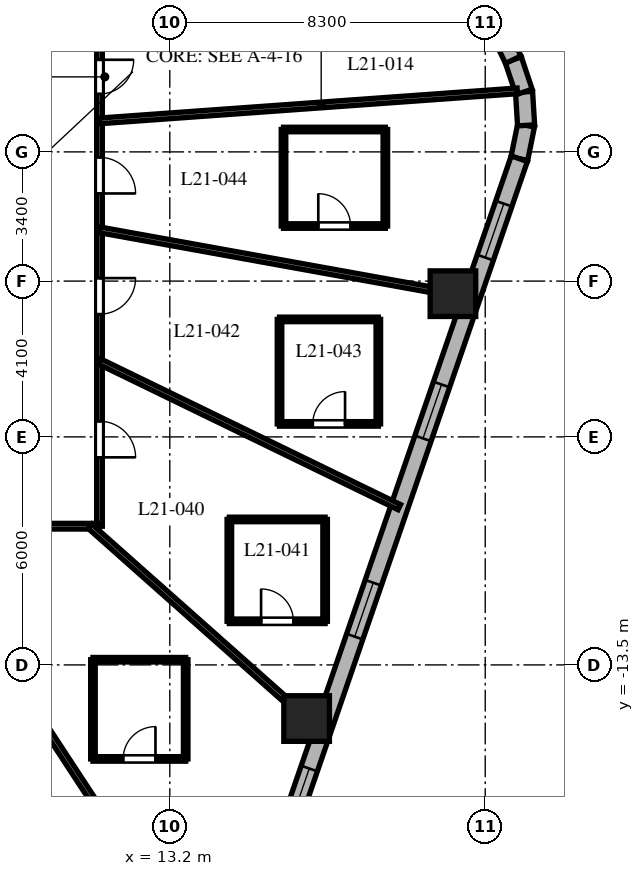
"""IFC4 building model, lengths in metres.
Left out: names, types, materials, properties, quantities, classifications, styles, units other than length and angle.
Written with IfcOpenShell. Run it as: python <this file> out.ifc"""

import sys

from ifc_helpers import new_model, si_unit, direction, frame, frame_2d, origin, origin_2d, place, context, subcontext, project, spatial, rectangle, extrude, element, fill, save


model = new_model("IFC4")
c1 = context("Model", 3, precision=1e-05, world=origin(), true_north=direction((0.0, 1.0)))
c2 = subcontext(c1, "Body", "Model", "MODEL_VIEW")
j1 = project(units=[si_unit("LENGTHUNIT", "METRE"), si_unit("PLANEANGLEUNIT", "RADIAN")], contexts=[c1])
p1 = place(None, origin())
s1 = spatial("IfcSite", under=j1, at=p1, CompositionType="ELEMENT")
p2 = place(p1, origin())
s2 = spatial("IfcBuilding", under=s1, at=p2, CompositionType="ELEMENT")
p3 = place(p2, frame((0.0, 0.0, 91.4)))
s3 = spatial("IfcBuildingStorey", under=s2, at=p3, CompositionType="ELEMENT", Elevation=91.4)
for number, where, z_axis, x_axis in (
    (1, (16.8, -14.911, 0.0), (0.0, 0.0, 1.0), (1.0, 0.0, 0.0)),
    (2, (20.65, -3.731, 0.0), (0.0, 0.0, 1.0), (1.0, 0.0, 0.0)),
):
    element("IfcColumn", number, at=place(p3, frame(where, z_axis=z_axis, x_axis=x_axis)), inside=s3, PredefinedType="COLUMN", context=c2, shape_type="SweptSolid", body=[
        extrude(rectangle(XDim=1.2, YDim=1.2, at=origin_2d()), origin(), (0.0, 0.0, 1.0), 3.7),
    ])
p4 = place(p3, frame((22.397, -0.179, 0.0), z_axis=(0.0, 0.0, 1.0), x_axis=(0.199313589404, 0.979935759669, 0.0)))
e3 = element("IfcWall", 3, at=p4, inside=s3, PredefinedType="SOLIDWALL", context=c2, shape_type="SweptSolid", body=[
    extrude(rectangle(XDim=0.896, YDim=0.45, at=frame_2d((0.448, 0.0))), origin(), (0.0, 0.0, 1.0), 3.4),
])
p5 = place(p3, frame((22.575, 0.698, 0.0), z_axis=(0.0, 0.0, 1.0), x_axis=(-0.060980441946, 0.998138961117, 0.0)))
e4 = element("IfcWall", 4, at=p5, inside=s3, PredefinedType="SOLIDWALL", context=c2, shape_type="SweptSolid", body=[
    extrude(rectangle(XDim=0.881, YDim=0.45, at=frame_2d((0.44, 0.0))), origin(), (0.0, 0.0, 1.0), 3.4),
])
p6 = place(p3, frame((22.522, 1.577, 0.0), z_axis=(0.0, 0.0, 1.0), x_axis=(-0.317372694837, 0.948300887151, 0.0)))
e5 = element("IfcWall", 5, at=p6, inside=s3, PredefinedType="SOLIDWALL", context=c2, shape_type="SweptSolid", body=[
    extrude(rectangle(XDim=0.896, YDim=0.45, at=frame_2d((0.448, 0.0))), origin(), (0.0, 0.0, 1.0), 3.4),
])
p7 = place(p3, frame((15.992, -18.777, 0.0), z_axis=(0.0, 0.0, 1.0), x_axis=(0.325606988926, 0.945505202927, 0.0)))
e6 = element("IfcWall", 6, at=p7, inside=s3, PredefinedType="SOLIDWALL", context=c2, shape_type="SweptSolid", body=[
    extrude(rectangle(XDim=19.669, YDim=0.45, at=frame_2d((9.835, 0.0))), origin(), (0.0, 0.0, 1.0), 3.4),
])
p8 = place(p7, frame((1.197, 0.0, 0.8)))
e7 = element("IfcOpeningElement", 7, at=p8, cuts=e6, PredefinedType="OPENING", context=c2, shape_type="SweptSolid", body=[
    extrude(rectangle(XDim=1.5, YDim=1.8, at=frame_2d((0.75, 0.9))), frame((0.0, 0.235, 0.0), z_axis=(0.0, -1.0, 0.0), x_axis=(1.0, 0.0, 0.0)), (0.0, 0.0, 1.0), 0.47),
])
p9 = place(p7, frame((6.368, 0.0, 0.8)))
e8 = element("IfcOpeningElement", 8, at=p9, cuts=e6, PredefinedType="OPENING", context=c2, shape_type="SweptSolid", body=[
    extrude(rectangle(XDim=1.5, YDim=1.8, at=frame_2d((0.75, 0.9))), frame((0.0, 0.235, 0.0), z_axis=(0.0, -1.0, 0.0), x_axis=(1.0, 0.0, 0.0)), (0.0, 0.0, 1.0), 0.47),
])
p10 = place(p7, frame((11.885, 0.0, 0.8)))
e9 = element("IfcOpeningElement", 9, at=p10, cuts=e6, PredefinedType="OPENING", context=c2, shape_type="SweptSolid", body=[
    extrude(rectangle(XDim=1.5, YDim=1.8, at=frame_2d((0.75, 0.9))), frame((0.0, 0.235, 0.0), z_axis=(0.0, -1.0, 0.0), x_axis=(1.0, 0.0, 0.0)), (0.0, 0.0, 1.0), 0.47),
])
p11 = place(p7, frame((16.918, 0.0, 0.8)))
e10 = element("IfcOpeningElement", 10, at=p11, cuts=e6, PredefinedType="OPENING", context=c2, shape_type="SweptSolid", body=[
    extrude(rectangle(XDim=1.5, YDim=1.8, at=frame_2d((0.75, 0.9))), frame((0.0, 0.235, 0.0), z_axis=(0.0, -1.0, 0.0), x_axis=(1.0, 0.0, 0.0)), (0.0, 0.0, 1.0), 0.47),
])
p12 = place(p3, frame((22.238, 2.427, 0.0), z_axis=(0.0, 0.0, 1.0), x_axis=(-0.438374803278, 0.898792262901, 0.0)))
e11 = element("IfcWall", 11, at=p12, inside=s3, PredefinedType="SOLIDWALL", context=c2, shape_type="SweptSolid", body=[
    extrude(rectangle(XDim=18.618, YDim=0.45, at=frame_2d((9.309, 0.0))), origin(), (0.0, 0.0, 1.0), 3.4),
])
p13 = place(p12, frame((4.62, 0.0, 0.0)))
e12 = element("IfcOpeningElement", 12, at=p13, cuts=e11, PredefinedType="OPENING", context=c2, shape_type="SweptSolid", body=[
    extrude(rectangle(XDim=1.0, YDim=2.15, at=frame_2d((0.5, 1.075))), frame((0.0, 0.235, 0.0), z_axis=(0.0, -1.0, 0.0), x_axis=(1.0, 0.0, 0.0)), (0.0, 0.0, 1.0), 0.47),
])
p14 = place(p12, frame((1.163, 0.0, 0.8)))
e13 = element("IfcOpeningElement", 13, at=p14, cuts=e11, PredefinedType="OPENING", context=c2, shape_type="SweptSolid", body=[
    extrude(rectangle(XDim=1.5, YDim=1.8, at=frame_2d((0.75, 0.9))), frame((0.0, 0.235, 0.0), z_axis=(0.0, -1.0, 0.0), x_axis=(1.0, 0.0, 0.0)), (0.0, 0.0, 1.0), 0.47),
])
p15 = place(p12, frame((8.61, 0.0, 0.8)))
e14 = element("IfcOpeningElement", 14, at=p15, cuts=e11, PredefinedType="OPENING", context=c2, shape_type="SweptSolid", body=[
    extrude(rectangle(XDim=1.5, YDim=1.8, at=frame_2d((0.75, 0.9))), frame((0.0, 0.235, 0.0), z_axis=(0.0, -1.0, 0.0), x_axis=(1.0, 0.0, 0.0)), (0.0, 0.0, 1.0), 0.47),
])
p16 = place(p12, frame((16.006, 0.0, 0.8)))
e15 = element("IfcOpeningElement", 15, at=p16, cuts=e11, PredefinedType="OPENING", context=c2, shape_type="SweptSolid", body=[
    extrude(rectangle(XDim=1.5, YDim=1.8, at=frame_2d((0.75, 0.9))), frame((0.0, 0.235, 0.0), z_axis=(0.0, -1.0, 0.0), x_axis=(1.0, 0.0, 0.0)), (0.0, 0.0, 1.0), 0.47),
])
p17 = place(p3, frame((11.35, 9.85, 0.0), z_axis=(0.0, 0.0, 1.0), x_axis=(0.0, -1.0, 0.0)))
e16 = element("IfcWall", 16, at=p17, inside=s3, PredefinedType="PARTITIONING", context=c2, shape_type="SweptSolid", body=[
    extrude(rectangle(XDim=19.7, YDim=0.15, at=frame_2d((9.85, 0.0))), origin(), (0.0, 0.0, 1.0), 2.84),
])
p18 = place(p17, frame((7.426, 0.0, 0.0)))
e17 = element("IfcOpeningElement", 17, at=p18, cuts=e16, PredefinedType="OPENING", context=c2, shape_type="SweptSolid", body=[
    extrude(rectangle(XDim=0.9, YDim=2.03, at=frame_2d((0.45, 1.015))), frame((0.0, 0.085, 0.0), z_axis=(0.0, -1.0, 0.0), x_axis=(1.0, 0.0, 0.0)), (0.0, 0.0, 1.0), 0.17),
])
p19 = place(p17, frame((3.008, 0.0, 0.0)))
e18 = element("IfcOpeningElement", 18, at=p19, cuts=e16, PredefinedType="OPENING", context=c2, shape_type="SweptSolid", body=[
    extrude(rectangle(XDim=0.95, YDim=2.03, at=frame_2d((0.475, 1.015))), frame((0.0, 0.085, 0.0), z_axis=(0.0, -1.0, 0.0), x_axis=(1.0, 0.0, 0.0)), (0.0, 0.0, 1.0), 0.17),
])
p20 = place(p17, frame((16.938, 0.0, 0.0)))
e19 = element("IfcOpeningElement", 19, at=p20, cuts=e16, PredefinedType="OPENING", context=c2, shape_type="SweptSolid", body=[
    extrude(rectangle(XDim=0.95, YDim=2.03, at=frame_2d((0.475, 1.015))), frame((0.0, 0.085, 0.0), z_axis=(0.0, -1.0, 0.0), x_axis=(1.0, 0.0, 0.0)), (0.0, 0.0, 1.0), 0.17),
])
p21 = place(p17, frame((13.171, 0.0, 0.0)))
e20 = element("IfcOpeningElement", 20, at=p21, cuts=e16, PredefinedType="OPENING", context=c2, shape_type="SweptSolid", body=[
    extrude(rectangle(XDim=0.95, YDim=2.03, at=frame_2d((0.475, 1.015))), frame((0.0, 0.085, 0.0), z_axis=(0.0, -1.0, 0.0), x_axis=(1.0, 0.0, 0.0)), (0.0, 0.0, 1.0), 0.17),
])
p22 = place(p17, frame((9.994, 0.0, 0.0)))
e21 = element("IfcOpeningElement", 21, at=p22, cuts=e16, PredefinedType="OPENING", context=c2, shape_type="SweptSolid", body=[
    extrude(rectangle(XDim=0.95, YDim=2.03, at=frame_2d((0.475, 1.015))), frame((0.0, 0.085, 0.0), z_axis=(0.0, -1.0, 0.0), x_axis=(1.0, 0.0, 0.0)), (0.0, 0.0, 1.0), 0.17),
])
p23 = place(p3, frame((11.35, -9.85, 0.0), z_axis=(0.0, 0.0, 1.0), x_axis=(-1.0, 0.0, 0.0)))
e22 = element("IfcWall", 22, at=p23, inside=s3, PredefinedType="PARTITIONING", context=c2, shape_type="SweptSolid", body=[
    extrude(rectangle(XDim=22.7, YDim=0.15, at=frame_2d((11.35, 0.0))), origin(), (0.0, 0.0, 1.0), 2.84),
])
p24 = place(p23, frame((17.237, 0.0, 0.0)))
e23 = element("IfcOpeningElement", 23, at=p24, cuts=e22, PredefinedType="OPENING", context=c2, shape_type="SweptSolid", body=[
    extrude(rectangle(XDim=0.95, YDim=2.03, at=frame_2d((0.475, 1.015))), frame((0.0, 0.085, 0.0), z_axis=(0.0, -1.0, 0.0), x_axis=(1.0, 0.0, 0.0)), (0.0, 0.0, 1.0), 0.17),
])
p25 = place(p23, frame((11.994, 0.0, 0.0)))
e24 = element("IfcOpeningElement", 24, at=p25, cuts=e22, PredefinedType="OPENING", context=c2, shape_type="SweptSolid", body=[
    extrude(rectangle(XDim=0.95, YDim=2.03, at=frame_2d((0.475, 1.015))), frame((0.0, 0.085, 0.0), z_axis=(0.0, -1.0, 0.0), x_axis=(1.0, 0.0, 0.0)), (0.0, 0.0, 1.0), 0.17),
])
p26 = place(p23, frame((8.559, 0.0, 0.0)))
e25 = element("IfcOpeningElement", 25, at=p26, cuts=e22, PredefinedType="OPENING", context=c2, shape_type="SweptSolid", body=[
    extrude(rectangle(XDim=0.95, YDim=2.03, at=frame_2d((0.475, 1.015))), frame((0.0, 0.085, 0.0), z_axis=(0.0, -1.0, 0.0), x_axis=(1.0, 0.0, 0.0)), (0.0, 0.0, 1.0), 0.17),
])
p27 = place(p23, frame((5.728, 0.0, 0.0)))
e26 = element("IfcOpeningElement", 26, at=p27, cuts=e22, PredefinedType="OPENING", context=c2, shape_type="SweptSolid", body=[
    extrude(rectangle(XDim=0.9, YDim=2.03, at=frame_2d((0.45, 1.015))), frame((0.0, 0.085, 0.0), z_axis=(0.0, -1.0, 0.0), x_axis=(1.0, 0.0, 0.0)), (0.0, 0.0, 1.0), 0.17),
])
p28 = place(p23, frame((2.093, 0.0, 0.0)))
e27 = element("IfcOpeningElement", 27, at=p28, cuts=e22, PredefinedType="OPENING", context=c2, shape_type="SweptSolid", body=[
    extrude(rectangle(XDim=0.95, YDim=2.03, at=frame_2d((0.475, 1.015))), frame((0.0, 0.085, 0.0), z_axis=(0.0, -1.0, 0.0), x_axis=(1.0, 0.0, 0.0)), (0.0, 0.0, 1.0), 0.17),
])
p29 = place(p3, frame((11.35, 0.816, 0.0), z_axis=(0.0, 0.0, 1.0), x_axis=(0.997427684746, 0.071679939324, 0.0)))
e28 = element("IfcWall", 28, at=p29, inside=s3, PredefinedType="PARTITIONING", context=c2, shape_type="SweptSolid", body=[
    extrude(rectangle(XDim=11.022, YDim=0.15, at=frame_2d((5.511, 0.0))), origin(), (0.0, 0.0, 1.0), 2.54),
])
p30 = place(p3, frame((6.454, -9.85, 0.0), z_axis=(0.0, 0.0, 1.0), x_axis=(0.548052950111, -0.836443640584, 0.0)))
e29 = element("IfcWall", 29, at=p30, inside=s3, PredefinedType="PARTITIONING", context=c2, shape_type="SweptSolid", body=[
    extrude(rectangle(XDim=13.019, YDim=0.15, at=frame_2d((6.51, 0.0))), origin(), (0.0, 0.0, 1.0), 2.54),
])
p31 = place(p3, frame((11.098, -9.85, 0.0), z_axis=(0.0, 0.0, 1.0), x_axis=(0.747904295103, -0.663806572253, 0.0)))
e30 = element("IfcWall", 30, at=p31, inside=s3, PredefinedType="PARTITIONING", context=c2, shape_type="SweptSolid", body=[
    extrude(rectangle(XDim=8.16, YDim=0.15, at=frame_2d((4.08, 0.0))), origin(), (0.0, 0.0, 1.0), 2.54),
])
p32 = place(p3, frame((11.35, -5.515, 0.0), z_axis=(0.0, 0.0, 1.0), x_axis=(0.899424695618, -0.437075756492, 0.0)))
e31 = element("IfcWall", 31, at=p32, inside=s3, PredefinedType="PARTITIONING", context=c2, shape_type="SweptSolid", body=[
    extrude(rectangle(XDim=8.771, YDim=0.15, at=frame_2d((4.386, 0.0))), origin(), (0.0, 0.0, 1.0), 2.54),
])
p33 = place(p3, frame((11.35, -2.051, 0.0), z_axis=(0.0, 0.0, 1.0), x_axis=(0.984068313063, -0.177790762484, 0.0)))
e32 = element("IfcWall", 32, at=p33, inside=s3, PredefinedType="PARTITIONING", context=c2, shape_type="SweptSolid", body=[
    extrude(rectangle(XDim=9.951, YDim=0.15, at=frame_2d((4.976, 0.0))), origin(), (0.0, 0.0, 1.0), 2.54),
])
p34 = place(p3, frame((11.178, -15.974, 0.0), z_axis=(0.0, 0.0, 1.0), x_axis=(1.0, 0.0, 0.0)))
e33 = element("IfcWall", 33, at=p34, inside=s3, PredefinedType="PARTITIONING", context=c2, shape_type="SweptSolid", body=[
    extrude(rectangle(XDim=2.44, YDim=0.12, at=frame_2d((1.22, 0.0))), origin(), (0.0, 0.0, 1.0), 3.4),
])
p35 = place(p34, frame((0.795, 0.0, 0.0)))
e34 = element("IfcOpeningElement", 34, at=p35, cuts=e33, PredefinedType="OPENING", context=c2, shape_type="SweptSolid", body=[
    extrude(rectangle(XDim=0.85, YDim=2.03, at=frame_2d((0.425, 1.015))), frame((0.0, 0.07, 0.0), z_axis=(0.0, -1.0, 0.0), x_axis=(1.0, 0.0, 0.0)), (0.0, 0.0, 1.0), 0.14),
])
p36 = place(p3, frame((13.618, -15.974, 0.0), z_axis=(0.0, 0.0, 1.0), x_axis=(0.0, 1.0, 0.0)))
e35 = element("IfcWall", 35, at=p36, inside=s3, PredefinedType="PARTITIONING", context=c2, shape_type="SweptSolid", body=[
    extrude(rectangle(XDim=2.61, YDim=0.12, at=frame_2d((1.305, 0.0))), origin(), (0.0, 0.0, 1.0), 3.4),
])
p37 = place(p3, frame((13.618, -13.364, 0.0), z_axis=(0.0, 0.0, 1.0), x_axis=(-1.0, 0.0, 0.0)))
e36 = element("IfcWall", 36, at=p37, inside=s3, PredefinedType="PARTITIONING", context=c2, shape_type="SweptSolid", body=[
    extrude(rectangle(XDim=2.44, YDim=0.12, at=frame_2d((1.22, 0.0))), origin(), (0.0, 0.0, 1.0), 2.927),
])
p38 = place(p3, frame((11.178, -13.364, 0.0), z_axis=(0.0, 0.0, 1.0), x_axis=(0.0, -1.0, 0.0)))
e37 = element("IfcWall", 37, at=p38, inside=s3, PredefinedType="PARTITIONING", context=c2, shape_type="SweptSolid", body=[
    extrude(rectangle(XDim=2.61, YDim=0.12, at=frame_2d((1.305, 0.0))), origin(), (0.0, 0.0, 1.0), 2.927),
])
p39 = place(p3, frame((14.767, -12.352, 0.0), z_axis=(0.0, 0.0, 1.0), x_axis=(1.0, 0.0, 0.0)))
e38 = element("IfcWall", 38, at=p39, inside=s3, PredefinedType="PARTITIONING", context=c2, shape_type="SweptSolid", body=[
    extrude(rectangle(XDim=2.52, YDim=0.12, at=frame_2d((1.26, 0.0))), origin(), (0.0, 0.0, 1.0), 3.4),
])
p40 = place(p39, frame((0.835, 0.0, 0.0)))
e39 = element("IfcOpeningElement", 39, at=p40, cuts=e38, PredefinedType="OPENING", context=c2, shape_type="SweptSolid", body=[
    extrude(rectangle(XDim=0.85, YDim=2.03, at=frame_2d((0.425, 1.015))), frame((0.0, 0.07, 0.0), z_axis=(0.0, -1.0, 0.0), x_axis=(1.0, 0.0, 0.0)), (0.0, 0.0, 1.0), 0.14),
])
p41 = place(p3, frame((17.287, -12.352, 0.0), z_axis=(0.0, 0.0, 1.0), x_axis=(0.0, 1.0, 0.0)))
e40 = element("IfcWall", 40, at=p41, inside=s3, PredefinedType="PARTITIONING", context=c2, shape_type="SweptSolid", body=[
    extrude(rectangle(XDim=2.68, YDim=0.12, at=frame_2d((1.34, 0.0))), origin(), (0.0, 0.0, 1.0), 3.4),
])
p42 = place(p3, frame((17.287, -9.672, 0.0), z_axis=(0.0, 0.0, 1.0), x_axis=(-1.0, 0.0, 0.0)))
e41 = element("IfcWall", 41, at=p42, inside=s3, PredefinedType="PARTITIONING", context=c2, shape_type="SweptSolid", body=[
    extrude(rectangle(XDim=2.52, YDim=0.12, at=frame_2d((1.26, 0.0))), origin(), (0.0, 0.0, 1.0), 2.972),
])
p43 = place(p3, frame((14.767, -9.672, 0.0), z_axis=(0.0, 0.0, 1.0), x_axis=(0.0, -1.0, 0.0)))
e42 = element("IfcWall", 42, at=p43, inside=s3, PredefinedType="PARTITIONING", context=c2, shape_type="SweptSolid", body=[
    extrude(rectangle(XDim=2.68, YDim=0.12, at=frame_2d((1.34, 0.0))), origin(), (0.0, 0.0, 1.0), 2.972),
])
p44 = place(p3, frame((16.087, -7.158, 0.0), z_axis=(0.0, 0.0, 1.0), x_axis=(1.0, 0.0, 0.0)))
e43 = element("IfcWall", 43, at=p44, inside=s3, PredefinedType="PARTITIONING", context=c2, shape_type="SweptSolid", body=[
    extrude(rectangle(XDim=2.6, YDim=0.12, at=frame_2d((1.3, 0.0))), origin(), (0.0, 0.0, 1.0), 2.972),
])
p45 = place(p44, frame((0.875, 0.0, 0.0)))
e44 = element("IfcOpeningElement", 44, at=p45, cuts=e43, PredefinedType="OPENING", context=c2, shape_type="SweptSolid", body=[
    extrude(rectangle(XDim=0.85, YDim=2.03, at=frame_2d((0.425, 1.015))), frame((0.0, 0.07, 0.0), z_axis=(0.0, -1.0, 0.0), x_axis=(1.0, 0.0, 0.0)), (0.0, 0.0, 1.0), 0.14),
])
p46 = place(p3, frame((18.687, -7.158, 0.0), z_axis=(0.0, 0.0, 1.0), x_axis=(0.0, 1.0, 0.0)))
e45 = element("IfcWall", 45, at=p46, inside=s3, PredefinedType="PARTITIONING", context=c2, shape_type="SweptSolid", body=[
    extrude(rectangle(XDim=2.75, YDim=0.12, at=frame_2d((1.375, 0.0))), origin(), (0.0, 0.0, 1.0), 2.84),
])
p47 = place(p3, frame((18.687, -4.408, 0.0), z_axis=(0.0, 0.0, 1.0), x_axis=(-1.0, 0.0, 0.0)))
e46 = element("IfcWall", 46, at=p47, inside=s3, PredefinedType="PARTITIONING", context=c2, shape_type="SweptSolid", body=[
    extrude(rectangle(XDim=2.6, YDim=0.12, at=frame_2d((1.3, 0.0))), origin(), (0.0, 0.0, 1.0), 2.84),
])
p48 = place(p3, frame((16.087, -4.408, 0.0), z_axis=(0.0, 0.0, 1.0), x_axis=(0.0, -1.0, 0.0)))
e47 = element("IfcWall", 47, at=p48, inside=s3, PredefinedType="PARTITIONING", context=c2, shape_type="SweptSolid", body=[
    extrude(rectangle(XDim=2.75, YDim=0.12, at=frame_2d((1.375, 0.0))), origin(), (0.0, 0.0, 1.0), 2.84),
])
p49 = place(p3, frame((16.192, -1.951, 0.0), z_axis=(0.0, 0.0, 1.0), x_axis=(1.0, 0.0, 0.0)))
e48 = element("IfcWall", 48, at=p49, inside=s3, PredefinedType="PARTITIONING", context=c2, shape_type="SweptSolid", body=[
    extrude(rectangle(XDim=2.68, YDim=0.12, at=frame_2d((1.34, 0.0))), origin(), (0.0, 0.0, 1.0), 2.841),
])
p50 = place(p49, frame((0.915, 0.0, 0.0)))
e49 = element("IfcOpeningElement", 49, at=p50, cuts=e48, PredefinedType="OPENING", context=c2, shape_type="SweptSolid", body=[
    extrude(rectangle(XDim=0.85, YDim=2.03, at=frame_2d((0.425, 1.015))), frame((0.0, 0.07, 0.0), z_axis=(0.0, -1.0, 0.0), x_axis=(1.0, 0.0, 0.0)), (0.0, 0.0, 1.0), 0.14),
])
p51 = place(p3, frame((18.872, -1.951, 0.0), z_axis=(0.0, 0.0, 1.0), x_axis=(0.0, 1.0, 0.0)))
e50 = element("IfcWall", 50, at=p51, inside=s3, PredefinedType="PARTITIONING", context=c2, shape_type="SweptSolid", body=[
    extrude(rectangle(XDim=2.54, YDim=0.12, at=frame_2d((1.27, 0.0))), origin(), (0.0, 0.0, 1.0), 3.4),
])
p52 = place(p3, frame((18.872, 0.589, 0.0), z_axis=(0.0, 0.0, 1.0), x_axis=(-1.0, 0.0, 0.0)))
e51 = element("IfcWall", 51, at=p52, inside=s3, PredefinedType="PARTITIONING", context=c2, shape_type="SweptSolid", body=[
    extrude(rectangle(XDim=2.68, YDim=0.12, at=frame_2d((1.34, 0.0))), origin(), (0.0, 0.0, 1.0), 2.841),
])
p53 = place(p3, frame((16.192, 0.589, 0.0), z_axis=(0.0, 0.0, 1.0), x_axis=(0.0, -1.0, 0.0)))
e52 = element("IfcWall", 52, at=p53, inside=s3, PredefinedType="PARTITIONING", context=c2, shape_type="SweptSolid", body=[
    extrude(rectangle(XDim=2.54, YDim=0.12, at=frame_2d((1.27, 0.0))), origin(), (0.0, 0.0, 1.0), 3.4),
])
p54 = place(p8, origin())
e53 = element("IfcWindow", 53, at=p54, inside=s3, PartitioningType="SINGLE_PANEL", PredefinedType="WINDOW", context=c2, shape_type="SweptSolid", body=[
    extrude(rectangle(XDim=1.5, YDim=1.8, at=frame_2d((0.75, 0.9))), frame((0.0, 0.03, 0.0), z_axis=(0.0, -1.0, 0.0), x_axis=(1.0, 0.0, 0.0)), (0.0, 0.0, 1.0), 0.06),
])
fill(e7, e53)
p55 = place(p9, origin())
e54 = element("IfcWindow", 54, at=p55, inside=s3, PartitioningType="SINGLE_PANEL", PredefinedType="WINDOW", context=c2, shape_type="SweptSolid", body=[
    extrude(rectangle(XDim=1.5, YDim=1.8, at=frame_2d((0.75, 0.9))), frame((0.0, 0.03, 0.0), z_axis=(0.0, -1.0, 0.0), x_axis=(1.0, 0.0, 0.0)), (0.0, 0.0, 1.0), 0.06),
])
fill(e8, e54)
p56 = place(p10, origin())
e55 = element("IfcWindow", 55, at=p56, inside=s3, PartitioningType="SINGLE_PANEL", PredefinedType="WINDOW", context=c2, shape_type="SweptSolid", body=[
    extrude(rectangle(XDim=1.5, YDim=1.8, at=frame_2d((0.75, 0.9))), frame((0.0, 0.03, 0.0), z_axis=(0.0, -1.0, 0.0), x_axis=(1.0, 0.0, 0.0)), (0.0, 0.0, 1.0), 0.06),
])
fill(e9, e55)
p57 = place(p11, origin())
e56 = element("IfcWindow", 56, at=p57, inside=s3, PartitioningType="SINGLE_PANEL", PredefinedType="WINDOW", context=c2, shape_type="SweptSolid", body=[
    extrude(rectangle(XDim=1.5, YDim=1.8, at=frame_2d((0.75, 0.9))), frame((0.0, 0.03, 0.0), z_axis=(0.0, -1.0, 0.0), x_axis=(1.0, 0.0, 0.0)), (0.0, 0.0, 1.0), 0.06),
])
fill(e10, e56)
p58 = place(p18, origin())
e57 = element("IfcDoor", 57, at=p58, inside=s3, OperationType="SINGLE_SWING_LEFT", PredefinedType="DOOR", context=c2, shape_type="SweptSolid", body=[
    extrude(rectangle(XDim=0.9, YDim=2.03, at=frame_2d((0.45, 1.015))), frame((0.0, 0.025, 0.0), z_axis=(0.0, -1.0, 0.0), x_axis=(1.0, 0.0, 0.0)), (0.0, 0.0, 1.0), 0.05),
])
fill(e17, e57)
p59 = place(p35, origin())
e58 = element("IfcDoor", 58, at=p59, inside=s3, OperationType="SINGLE_SWING_RIGHT", PredefinedType="DOOR", context=c2, shape_type="SweptSolid", body=[
    extrude(rectangle(XDim=0.85, YDim=2.03, at=frame_2d((0.425, 1.015))), frame((0.0, 0.025, 0.0), z_axis=(0.0, -1.0, 0.0), x_axis=(1.0, 0.0, 0.0)), (0.0, 0.0, 1.0), 0.05),
])
fill(e34, e58)
p60 = place(p20, origin())
e59 = element("IfcDoor", 59, at=p60, inside=s3, OperationType="SINGLE_SWING_RIGHT", PredefinedType="DOOR", context=c2, shape_type="SweptSolid", body=[
    extrude(rectangle(XDim=0.95, YDim=2.03, at=frame_2d((0.475, 1.015))), frame((0.0, 0.025, 0.0), z_axis=(0.0, -1.0, 0.0), x_axis=(1.0, 0.0, 0.0)), (0.0, 0.0, 1.0), 0.05),
])
fill(e19, e59)
p61 = place(p40, origin())
e60 = element("IfcDoor", 60, at=p61, inside=s3, OperationType="SINGLE_SWING_LEFT", PredefinedType="DOOR", context=c2, shape_type="SweptSolid", body=[
    extrude(rectangle(XDim=0.85, YDim=2.03, at=frame_2d((0.425, 1.015))), frame((0.0, 0.025, 0.0), z_axis=(0.0, -1.0, 0.0), x_axis=(1.0, 0.0, 0.0)), (0.0, 0.0, 1.0), 0.05),
])
fill(e39, e60)
p62 = place(p21, origin())
e61 = element("IfcDoor", 61, at=p62, inside=s3, OperationType="SINGLE_SWING_LEFT", PredefinedType="DOOR", context=c2, shape_type="SweptSolid", body=[
    extrude(rectangle(XDim=0.95, YDim=2.03, at=frame_2d((0.475, 1.015))), frame((0.0, 0.025, 0.0), z_axis=(0.0, -1.0, 0.0), x_axis=(1.0, 0.0, 0.0)), (0.0, 0.0, 1.0), 0.05),
])
fill(e20, e61)
p63 = place(p45, origin())
e62 = element("IfcDoor", 62, at=p63, inside=s3, OperationType="SINGLE_SWING_RIGHT", PredefinedType="DOOR", context=c2, shape_type="SweptSolid", body=[
    extrude(rectangle(XDim=0.85, YDim=2.03, at=frame_2d((0.425, 1.015))), frame((0.0, 0.025, 0.0), z_axis=(0.0, -1.0, 0.0), x_axis=(1.0, 0.0, 0.0)), (0.0, 0.0, 1.0), 0.05),
])
fill(e44, e62)
p64 = place(p22, origin())
e63 = element("IfcDoor", 63, at=p64, inside=s3, OperationType="SINGLE_SWING_RIGHT", PredefinedType="DOOR", context=c2, shape_type="SweptSolid", body=[
    extrude(rectangle(XDim=0.95, YDim=2.03, at=frame_2d((0.475, 1.015))), frame((0.0, 0.025, 0.0), z_axis=(0.0, -1.0, 0.0), x_axis=(1.0, 0.0, 0.0)), (0.0, 0.0, 1.0), 0.05),
])
fill(e21, e63)
p65 = place(p50, origin())
e64 = element("IfcDoor", 64, at=p65, inside=s3, OperationType="SINGLE_SWING_LEFT", PredefinedType="DOOR", context=c2, shape_type="SweptSolid", body=[
    extrude(rectangle(XDim=0.85, YDim=2.03, at=frame_2d((0.425, 1.015))), frame((0.0, 0.025, 0.0), z_axis=(0.0, -1.0, 0.0), x_axis=(1.0, 0.0, 0.0)), (0.0, 0.0, 1.0), 0.05),
])
fill(e49, e64)
save(model, sys.argv[1])
